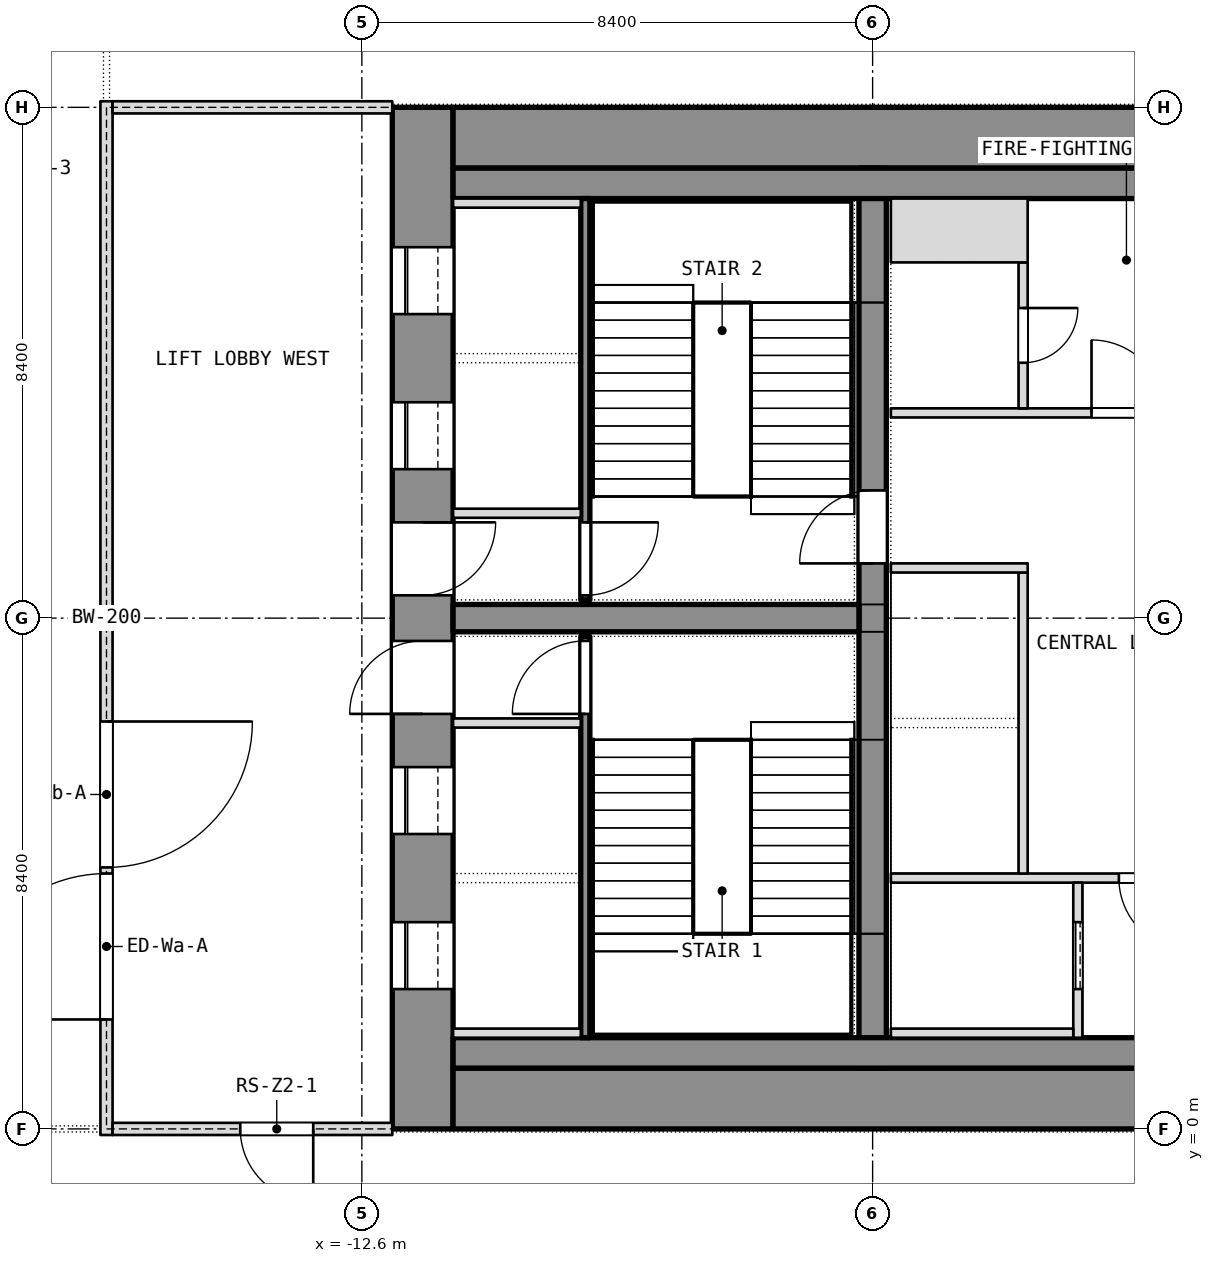
"""IFC4 building model, lengths in metres.
Left out: names, types, materials, properties, quantities, classifications, styles, units other than length and angle.
Written with IfcOpenShell. Run it as: python <this file> out.ifc"""

import sys

from ifc_helpers import new_model, si_unit, direction, frame, frame_2d, origin, place, context, subcontext, project, spatial, rectangle, extrude, element, fill, save


model = new_model("IFC4")
c1 = context("Model", 3, precision=1e-05, world=origin(), true_north=direction((0.0, 1.0)))
c2 = subcontext(c1, "Body", "Model", "MODEL_VIEW")
j1 = project(units=[si_unit("LENGTHUNIT", "METRE"), si_unit("PLANEANGLEUNIT", "RADIAN")], contexts=[c1])
p1 = place(None, origin())
s1 = spatial("IfcSite", under=j1, at=p1, CompositionType="ELEMENT")
p2 = place(p1, origin())
s2 = spatial("IfcBuilding", under=s1, at=p2, CompositionType="ELEMENT")
p3 = place(p2, frame((0.0, 0.0, 97.7)))
s3 = spatial("IfcBuildingStorey", under=s2, at=p3, CompositionType="ELEMENT", Elevation=97.7)
p4 = place(p3, frame((-11.6, 0.0, 0.0), z_axis=(0.0, 0.0, 1.0), x_axis=(0.0, 1.0, 0.0)))
e1 = element("IfcWall", 1, at=p4, inside=s3, PredefinedType="SHEAR", context=c2, shape_type="SweptSolid", body=[
    extrude(rectangle(XDim=16.8, YDim=1.0, at=frame_2d((8.4, 0.0))), origin(), (0.0, 0.0, 1.0), 7.2),
])
p5 = place(p4, frame((2.3, 0.0, 0.0)))
e2 = element("IfcOpeningElement", 2, at=p5, cuts=e1, PredefinedType="OPENING", context=c2, shape_type="SweptSolid", body=[
    extrude(rectangle(XDim=1.1, YDim=2.1, at=frame_2d((0.55, 1.05))), frame((0.0, 0.5, 0.0), z_axis=(0.0, -1.0, 0.0), x_axis=(1.0, 0.0, 0.0)), (0.0, 0.0, 1.0), 1.0),
])
p6 = place(p4, frame((4.85, 0.0, 0.0)))
e3 = element("IfcOpeningElement", 3, at=p6, cuts=e1, PredefinedType="OPENING", context=c2, shape_type="SweptSolid", body=[
    extrude(rectangle(XDim=1.1, YDim=2.1, at=frame_2d((0.55, 1.05))), frame((0.0, 0.5, 0.0), z_axis=(0.0, -1.0, 0.0), x_axis=(1.0, 0.0, 0.0)), (0.0, 0.0, 1.0), 1.0),
])
p7 = place(p4, frame((6.825, 0.0, 0.0)))
e4 = element("IfcOpeningElement", 4, at=p7, cuts=e1, PredefinedType="OPENING", context=c2, shape_type="SweptSolid", body=[
    extrude(rectangle(XDim=1.2, YDim=2.1, at=frame_2d((0.6, 1.05))), frame((0.0, 0.5, 0.0), z_axis=(0.0, -1.0, 0.0), x_axis=(1.0, 0.0, 0.0)), (0.0, 0.0, 1.0), 1.0),
])
p8 = place(p4, frame((13.4, 0.0, 0.0)))
e5 = element("IfcOpeningElement", 5, at=p8, cuts=e1, PredefinedType="OPENING", context=c2, shape_type="SweptSolid", body=[
    extrude(rectangle(XDim=1.1, YDim=2.1, at=frame_2d((0.55, 1.05))), frame((0.0, 0.5, 0.0), z_axis=(0.0, -1.0, 0.0), x_axis=(1.0, 0.0, 0.0)), (0.0, 0.0, 1.0), 1.0),
])
p9 = place(p4, frame((10.85, 0.0, 0.0)))
e6 = element("IfcOpeningElement", 6, at=p9, cuts=e1, PredefinedType="OPENING", context=c2, shape_type="SweptSolid", body=[
    extrude(rectangle(XDim=1.1, YDim=2.1, at=frame_2d((0.55, 1.05))), frame((0.0, 0.5, 0.0), z_axis=(0.0, -1.0, 0.0), x_axis=(1.0, 0.0, 0.0)), (0.0, 0.0, 1.0), 1.0),
])
p10 = place(p4, frame((8.775, 0.0, 0.0)))
e7 = element("IfcOpeningElement", 7, at=p10, cuts=e1, PredefinedType="OPENING", context=c2, shape_type="SweptSolid", body=[
    extrude(rectangle(XDim=1.2, YDim=2.1, at=frame_2d((0.6, 1.05))), frame((0.0, 0.5, 0.0), z_axis=(0.0, -1.0, 0.0), x_axis=(1.0, 0.0, 0.0)), (0.0, 0.0, 1.0), 1.0),
])
for number, where, z_axis, x_axis in (
    (8, (-11.1, 0.5, 0.0), (0.0, 0.0, 1.0), (1.0, 0.0, 0.0)),
    (9, (-11.1, 16.3, 0.0), (0.0, 0.0, 1.0), (1.0, 0.0, 0.0)),
):
    element("IfcWall", number, at=place(p3, frame(where, z_axis=z_axis, x_axis=x_axis)), inside=s3, PredefinedType="SHEAR", context=c2, shape_type="SweptSolid", body=[
        extrude(rectangle(XDim=22.2, YDim=1.0, at=frame_2d((11.1, 0.0))), origin(), (0.0, 0.0, 1.0), 7.2),
    ])
p11 = place(p3, frame((-4.2, 1.0, 0.0), z_axis=(0.0, 0.0, 1.0), x_axis=(0.0, 1.0, 0.0)))
e10 = element("IfcWall", 10, at=p11, inside=s3, PredefinedType="SHEAR", context=c2, shape_type="SweptSolid", body=[
    extrude(rectangle(XDim=14.8, YDim=0.45, at=frame_2d((7.4, 0.0))), origin(), (0.0, 0.0, 1.0), 7.2),
])
p12 = place(p11, frame((8.3, 0.0, 0.0)))
e11 = element("IfcOpeningElement", 11, at=p12, cuts=e10, PredefinedType="OPENING", context=c2, shape_type="SweptSolid", body=[
    extrude(rectangle(XDim=1.2, YDim=2.1, at=frame_2d((0.6, 1.05))), frame((0.0, 0.225, 0.0), z_axis=(0.0, -1.0, 0.0), x_axis=(1.0, 0.0, 0.0)), (0.0, 0.0, 1.0), 0.45),
])
p13 = place(p3, frame((-11.1, 8.4, 0.0), z_axis=(0.0, 0.0, 1.0), x_axis=(1.0, 0.0, 0.0)))
e12 = element("IfcWall", 12, at=p13, inside=s3, PredefinedType="SHEAR", context=c2, shape_type="SweptSolid", body=[
    extrude(rectangle(XDim=6.675, YDim=0.45, at=frame_2d((3.337, 0.0))), origin(), (0.0, 0.0, 1.0), 7.2),
])
for number, where, z_axis, x_axis in (
    (13, (-11.1, 1.25, 0.0), (0.0, 0.0, 1.0), (1.0, 0.0, 0.0)),
    (14, (-11.1, 15.55, 0.0), (0.0, 0.0, 1.0), (1.0, 0.0, 0.0)),
):
    element("IfcWall", number, at=place(p3, frame(where, z_axis=z_axis, x_axis=x_axis)), inside=s3, PredefinedType="PARTITIONING", context=c2, shape_type="SweptSolid", body=[
        extrude(rectangle(XDim=22.2, YDim=0.5, at=frame_2d((11.1, 0.0))), origin(), (0.0, 0.0, 1.0), 6.94),
    ])
p14 = place(p3, frame((-8.925, 1.5, 0.0), z_axis=(0.0, 0.0, 1.0), x_axis=(0.0, 1.0, 0.0)))
e15 = element("IfcWall", 15, at=p14, inside=s3, PredefinedType="SHEAR", context=c2, shape_type="SweptSolid", body=[
    extrude(rectangle(XDim=6.6, YDim=0.15, at=frame_2d((3.3, 0.0))), origin(), (0.0, 0.0, 1.0), 6.94),
])
p15 = place(p14, frame((5.325, 0.0, 0.0)))
e16 = element("IfcOpeningElement", 16, at=p15, cuts=e15, PredefinedType="OPENING", context=c2, shape_type="SweptSolid", body=[
    extrude(rectangle(XDim=1.2, YDim=2.1, at=frame_2d((0.6, 1.05))), frame((0.0, 0.075, 0.0), z_axis=(0.0, -1.0, 0.0), x_axis=(1.0, 0.0, 0.0)), (0.0, 0.0, 1.0), 0.15),
])
for number, where, z_axis, x_axis in (
    (17, (-11.1, 6.675, 0.0), (0.0, 0.0, 1.0), (1.0, 0.0, 0.0)),
    (18, (-11.1, 1.575, 0.0), (0.0, 0.0, 1.0), (1.0, 0.0, 0.0)),
):
    element("IfcWall", number, at=place(p3, frame(where, z_axis=z_axis, x_axis=x_axis)), inside=s3, PredefinedType="SHEAR", context=c2, shape_type="SweptSolid", body=[
        extrude(rectangle(XDim=2.1, YDim=0.15, at=frame_2d((1.05, 0.0))), origin(), (0.0, 0.0, 1.0), 6.94),
    ])
p16 = place(p3, frame((-8.925, 8.7, 0.0), z_axis=(0.0, 0.0, 1.0), x_axis=(0.0, 1.0, 0.0)))
e19 = element("IfcWall", 19, at=p16, inside=s3, PredefinedType="SHEAR", context=c2, shape_type="SweptSolid", body=[
    extrude(rectangle(XDim=6.6, YDim=0.15, at=frame_2d((3.3, 0.0))), origin(), (0.0, 0.0, 1.0), 6.94),
])
p17 = place(p16, frame((0.075, 0.0, 0.0)))
e20 = element("IfcOpeningElement", 20, at=p17, cuts=e19, PredefinedType="OPENING", context=c2, shape_type="SweptSolid", body=[
    extrude(rectangle(XDim=1.2, YDim=2.1, at=frame_2d((0.6, 1.05))), frame((0.0, 0.075, 0.0), z_axis=(0.0, -1.0, 0.0), x_axis=(1.0, 0.0, 0.0)), (0.0, 0.0, 1.0), 0.15),
])
for number, where, z_axis, x_axis in (
    (21, (-11.1, 10.125, 0.0), (0.0, 0.0, 1.0), (1.0, 0.0, 0.0)),
    (22, (-11.1, 15.225, 0.0), (0.0, 0.0, 1.0), (1.0, 0.0, 0.0)),
):
    element("IfcWall", number, at=place(p3, frame(where, z_axis=z_axis, x_axis=x_axis)), inside=s3, PredefinedType="SHEAR", context=c2, shape_type="SweptSolid", body=[
        extrude(rectangle(XDim=2.1, YDim=0.15, at=frame_2d((1.05, 0.0))), origin(), (0.0, 0.0, 1.0), 6.94),
    ])
p18 = place(p3, frame((-3.9, 4.125, 0.0), z_axis=(0.0, 0.0, 1.0), x_axis=(1.0, 0.0, 0.0)))
e23 = element("IfcWall", 23, at=p18, inside=s3, PredefinedType="PARTITIONING", context=c2, shape_type="SweptSolid", body=[
    extrude(rectangle(XDim=7.8, YDim=0.15, at=frame_2d((3.9, 0.0))), origin(), (0.0, 0.0, 1.0), 6.94),
])
p19 = place(p18, frame((3.75, 0.0, 0.0)))
e24 = element("IfcOpeningElement", 24, at=p19, cuts=e23, PredefinedType="OPENING", context=c2, shape_type="SweptSolid", body=[
    extrude(rectangle(XDim=1.2, YDim=2.1, at=frame_2d((0.6, 1.05))), frame((0.0, 0.075, 0.0), z_axis=(0.0, -1.0, 0.0), x_axis=(1.0, 0.0, 0.0)), (0.0, 0.0, 1.0), 0.15),
])
p20 = place(p3, frame((-3.9, 11.775, 0.0), z_axis=(0.0, 0.0, 1.0), x_axis=(1.0, 0.0, 0.0)))
e25 = element("IfcWall", 25, at=p20, inside=s3, PredefinedType="PARTITIONING", context=c2, shape_type="SweptSolid", body=[
    extrude(rectangle(XDim=7.8, YDim=0.15, at=frame_2d((3.9, 0.0))), origin(), (0.0, 0.0, 1.0), 6.94),
])
p21 = place(p20, frame((3.3, 0.0, 0.0)))
e26 = element("IfcOpeningElement", 26, at=p21, cuts=e25, PredefinedType="OPENING", context=c2, shape_type="SweptSolid", body=[
    extrude(rectangle(XDim=1.2, YDim=2.1, at=frame_2d((0.6, 1.05))), frame((0.0, 0.075, 0.0), z_axis=(0.0, -1.0, 0.0), x_axis=(1.0, 0.0, 0.0)), (0.0, 0.0, 1.0), 0.15),
])
p22 = place(p3, frame((-0.825, 1.5, 0.0), z_axis=(0.0, 0.0, 1.0), x_axis=(0.0, 1.0, 0.0)))
e27 = element("IfcWall", 27, at=p22, inside=s3, PredefinedType="SHEAR", context=c2, shape_type="SweptSolid", body=[
    extrude(rectangle(XDim=2.55, YDim=0.15, at=frame_2d((1.275, 0.0))), origin(), (0.0, 0.0, 1.0), 7.2),
])
p23 = place(p22, frame((0.8, 0.0, 0.0)))
e28 = element("IfcOpeningElement", 28, at=p23, cuts=e27, PredefinedType="OPENING", context=c2, shape_type="SweptSolid", body=[
    extrude(rectangle(XDim=1.1, YDim=2.1, at=frame_2d((0.55, 1.05))), frame((0.0, 0.075, 0.0), z_axis=(0.0, -1.0, 0.0), x_axis=(1.0, 0.0, 0.0)), (0.0, 0.0, 1.0), 0.15),
])
p24 = place(p3, frame((-3.9, 1.575, 0.0), z_axis=(0.0, 0.0, 1.0), x_axis=(1.0, 0.0, 0.0)))
e29 = element("IfcWall", 29, at=p24, inside=s3, PredefinedType="SHEAR", context=c2, shape_type="SweptSolid", body=[
    extrude(rectangle(XDim=3.0, YDim=0.15, at=frame_2d((1.5, 0.0))), origin(), (0.0, 0.0, 1.0), 7.2),
])
p25 = place(p3, frame((-1.725, 4.2, 0.0), z_axis=(0.0, 0.0, 1.0), x_axis=(0.0, 1.0, 0.0)))
e30 = element("IfcWall", 30, at=p25, inside=s3, PredefinedType="SHEAR", context=c2, shape_type="SweptSolid", body=[
    extrude(rectangle(XDim=4.95, YDim=0.15, at=frame_2d((2.475, 0.0))), origin(), (0.0, 0.0, 1.0), 7.2),
])
p26 = place(p3, frame((-3.9, 9.225, 0.0), z_axis=(0.0, 0.0, 1.0), x_axis=(1.0, 0.0, 0.0)))
e31 = element("IfcWall", 31, at=p26, inside=s3, PredefinedType="SHEAR", context=c2, shape_type="SweptSolid", body=[
    extrude(rectangle(XDim=2.25, YDim=0.15, at=frame_2d((1.125, 0.0))), origin(), (0.0, 0.0, 1.0), 7.2),
])
p27 = place(p3, frame((-1.725, 11.85, 0.0), z_axis=(0.0, 0.0, 1.0), x_axis=(0.0, 1.0, 0.0)))
e32 = element("IfcWall", 32, at=p27, inside=s3, PredefinedType="PARTITIONING", context=c2, shape_type="SweptSolid", body=[
    extrude(rectangle(XDim=2.4, YDim=0.15, at=frame_2d((1.2, 0.0))), origin(), (0.0, 0.0, 1.0), 6.94),
])
p28 = place(p27, frame((0.75, 0.0, 0.0)))
e33 = element("IfcOpeningElement", 33, at=p28, cuts=e32, PredefinedType="OPENING", context=c2, shape_type="SweptSolid", body=[
    extrude(rectangle(XDim=0.9, YDim=2.1, at=frame_2d((0.45, 1.05))), frame((0.0, 0.075, 0.0), z_axis=(0.0, -1.0, 0.0), x_axis=(1.0, 0.0, 0.0)), (0.0, 0.0, 1.0), 0.15),
])
p29 = place(p3, frame((-3.9, 14.775, 0.0), z_axis=(0.0, 0.0, 1.0), x_axis=(1.0, 0.0, 0.0)))
e34 = element("IfcWall", 34, at=p29, inside=s3, PredefinedType="PARTITIONING", context=c2, shape_type="SweptSolid", body=[
    extrude(rectangle(XDim=2.25, YDim=1.05, at=frame_2d((1.125, 0.0))), origin(), (0.0, 0.0, 1.0), 6.94),
])
p30 = place(p3, frame((-16.8, -0.1, 0.0), z_axis=(0.0, 0.0, 1.0), x_axis=(0.0, 1.0, 0.0)))
e35 = element("IfcWall", 35, at=p30, inside=s3, PredefinedType="PARTITIONING", context=c2, shape_type="SweptSolid", body=[
    extrude(rectangle(XDim=17.0, YDim=0.2, at=frame_2d((8.5, 0.0))), origin(), (0.0, 0.0, 1.0), 6.94),
])
p31 = place(p30, frame((1.9, 0.0, 0.0)))
e36 = element("IfcOpeningElement", 36, at=p31, cuts=e35, PredefinedType="OPENING", context=c2, shape_type="SweptSolid", body=[
    extrude(rectangle(XDim=2.4, YDim=2.1, at=frame_2d((1.2, 1.05))), frame((0.0, 0.1, 0.0), z_axis=(0.0, -1.0, 0.0), x_axis=(1.0, 0.0, 0.0)), (0.0, 0.0, 1.0), 0.2),
])
p32 = place(p30, frame((4.4, 0.0, 0.0)))
e37 = element("IfcOpeningElement", 37, at=p32, cuts=e35, PredefinedType="OPENING", context=c2, shape_type="SweptSolid", body=[
    extrude(rectangle(XDim=2.4, YDim=2.1, at=frame_2d((1.2, 1.05))), frame((0.0, 0.1, 0.0), z_axis=(0.0, -1.0, 0.0), x_axis=(1.0, 0.0, 0.0)), (0.0, 0.0, 1.0), 0.2),
])
p33 = place(p3, frame((-16.7, 0.0, 0.0), z_axis=(0.0, 0.0, 1.0), x_axis=(1.0, 0.0, 0.0)))
e38 = element("IfcWall", 38, at=p33, inside=s3, PredefinedType="PARTITIONING", context=c2, shape_type="SweptSolid", body=[
    extrude(rectangle(XDim=4.6, YDim=0.2, at=frame_2d((2.3, 0.0))), origin(), (0.0, 0.0, 1.0), 6.49),
])
p34 = place(p33, frame((2.1, 0.0, 0.0)))
e39 = element("IfcOpeningElement", 39, at=p34, cuts=e38, PredefinedType="OPENING", context=c2, shape_type="SweptSolid", body=[
    extrude(rectangle(XDim=1.2, YDim=2.1, at=frame_2d((0.6, 1.05))), frame((0.0, 0.1, 0.0), z_axis=(0.0, -1.0, 0.0), x_axis=(1.0, 0.0, 0.0)), (0.0, 0.0, 1.0), 0.2),
])
p35 = place(p3, frame((-16.7, 16.8, 0.0), z_axis=(0.0, 0.0, 1.0), x_axis=(1.0, 0.0, 0.0)))
e40 = element("IfcWall", 40, at=p35, inside=s3, PredefinedType="PARTITIONING", context=c2, shape_type="SweptSolid", body=[
    extrude(rectangle(XDim=4.6, YDim=0.2, at=frame_2d((2.3, 0.0))), origin(), (0.0, 0.0, 1.0), 6.49),
])
p36 = place(p5, origin())
e41 = element("IfcDoor", 41, at=p36, inside=s3, OperationType="SLIDING_TO_LEFT", PredefinedType="DOOR", context=c2, shape_type="SweptSolid", body=[
    extrude(rectangle(XDim=1.1, YDim=2.1, at=frame_2d((0.55, 1.05))), frame((0.0, 0.025, 0.0), z_axis=(0.0, -1.0, 0.0), x_axis=(1.0, 0.0, 0.0)), (0.0, 0.0, 1.0), 0.05),
])
fill(e2, e41)
p37 = place(p6, origin())
e42 = element("IfcDoor", 42, at=p37, inside=s3, OperationType="SLIDING_TO_LEFT", PredefinedType="DOOR", context=c2, shape_type="SweptSolid", body=[
    extrude(rectangle(XDim=1.1, YDim=2.1, at=frame_2d((0.55, 1.05))), frame((0.0, 0.025, 0.0), z_axis=(0.0, -1.0, 0.0), x_axis=(1.0, 0.0, 0.0)), (0.0, 0.0, 1.0), 0.05),
])
fill(e3, e42)
p38 = place(p7, origin())
e43 = element("IfcDoor", 43, at=p38, inside=s3, OperationType="SINGLE_SWING_LEFT", PredefinedType="DOOR", context=c2, shape_type="SweptSolid", body=[
    extrude(rectangle(XDim=1.2, YDim=2.1, at=frame_2d((0.6, 1.05))), frame((0.0, 0.025, 0.0), z_axis=(0.0, -1.0, 0.0), x_axis=(1.0, 0.0, 0.0)), (0.0, 0.0, 1.0), 0.05),
])
fill(e4, e43)
p39 = place(p15, origin())
e44 = element("IfcDoor", 44, at=p39, inside=s3, OperationType="SINGLE_SWING_LEFT", PredefinedType="DOOR", context=c2, shape_type="SweptSolid", body=[
    extrude(rectangle(XDim=1.2, YDim=2.1, at=frame_2d((0.6, 1.05))), frame((0.0, 0.025, 0.0), z_axis=(0.0, -1.0, 0.0), x_axis=(1.0, 0.0, 0.0)), (0.0, 0.0, 1.0), 0.05),
])
fill(e16, e44)
p40 = place(p8, origin())
e45 = element("IfcDoor", 45, at=p40, inside=s3, OperationType="SLIDING_TO_LEFT", PredefinedType="DOOR", context=c2, shape_type="SweptSolid", body=[
    extrude(rectangle(XDim=1.1, YDim=2.1, at=frame_2d((0.55, 1.05))), frame((0.0, 0.025, 0.0), z_axis=(0.0, -1.0, 0.0), x_axis=(1.0, 0.0, 0.0)), (0.0, 0.0, 1.0), 0.05),
])
fill(e5, e45)
p41 = place(p9, origin())
e46 = element("IfcDoor", 46, at=p41, inside=s3, OperationType="SLIDING_TO_LEFT", PredefinedType="DOOR", context=c2, shape_type="SweptSolid", body=[
    extrude(rectangle(XDim=1.1, YDim=2.1, at=frame_2d((0.55, 1.05))), frame((0.0, 0.025, 0.0), z_axis=(0.0, -1.0, 0.0), x_axis=(1.0, 0.0, 0.0)), (0.0, 0.0, 1.0), 0.05),
])
fill(e6, e46)
p42 = place(p10, origin())
e47 = element("IfcDoor", 47, at=p42, inside=s3, OperationType="SINGLE_SWING_LEFT", PredefinedType="DOOR", context=c2, shape_type="SweptSolid", body=[
    extrude(rectangle(XDim=1.2, YDim=2.1, at=frame_2d((0.6, 1.05))), frame((0.0, 0.025, 0.0), z_axis=(0.0, -1.0, 0.0), x_axis=(1.0, 0.0, 0.0)), (0.0, 0.0, 1.0), 0.05),
])
fill(e7, e47)
p43 = place(p17, origin())
e48 = element("IfcDoor", 48, at=p43, inside=s3, OperationType="SINGLE_SWING_LEFT", PredefinedType="DOOR", context=c2, shape_type="SweptSolid", body=[
    extrude(rectangle(XDim=1.2, YDim=2.1, at=frame_2d((0.6, 1.05))), frame((0.0, 0.025, 0.0), z_axis=(0.0, -1.0, 0.0), x_axis=(1.0, 0.0, 0.0)), (0.0, 0.0, 1.0), 0.05),
])
fill(e20, e48)
p44 = place(p23, origin())
e49 = element("IfcDoor", 49, at=p44, inside=s3, OperationType="SLIDING_TO_LEFT", PredefinedType="DOOR", context=c2, shape_type="SweptSolid", body=[
    extrude(rectangle(XDim=1.1, YDim=2.1, at=frame_2d((0.55, 1.05))), frame((0.0, 0.025, 0.0), z_axis=(0.0, -1.0, 0.0), x_axis=(1.0, 0.0, 0.0)), (0.0, 0.0, 1.0), 0.05),
])
fill(e28, e49)
p45 = place(p19, origin())
e50 = element("IfcDoor", 50, at=p45, inside=s3, OperationType="SINGLE_SWING_LEFT", PredefinedType="DOOR", context=c2, shape_type="SweptSolid", body=[
    extrude(rectangle(XDim=1.2, YDim=2.1, at=frame_2d((0.6, 1.05))), frame((0.0, 0.025, 0.0), z_axis=(0.0, -1.0, 0.0), x_axis=(1.0, 0.0, 0.0)), (0.0, 0.0, 1.0), 0.05),
])
fill(e24, e50)
p46 = place(p21, origin())
e51 = element("IfcDoor", 51, at=p46, inside=s3, OperationType="SINGLE_SWING_LEFT", PredefinedType="DOOR", context=c2, shape_type="SweptSolid", body=[
    extrude(rectangle(XDim=1.2, YDim=2.1, at=frame_2d((0.6, 1.05))), frame((0.0, 0.025, 0.0), z_axis=(0.0, -1.0, 0.0), x_axis=(1.0, 0.0, 0.0)), (0.0, 0.0, 1.0), 0.05),
])
fill(e26, e51)
p47 = place(p28, origin())
e52 = element("IfcDoor", 52, at=p47, inside=s3, OperationType="SINGLE_SWING_LEFT", PredefinedType="DOOR", context=c2, shape_type="SweptSolid", body=[
    extrude(rectangle(XDim=0.9, YDim=2.1, at=frame_2d((0.45, 1.05))), frame((0.0, 0.025, 0.0), z_axis=(0.0, -1.0, 0.0), x_axis=(1.0, 0.0, 0.0)), (0.0, 0.0, 1.0), 0.05),
])
fill(e33, e52)
p48 = place(p12, origin())
e53 = element("IfcDoor", 53, at=p48, inside=s3, OperationType="SINGLE_SWING_LEFT", PredefinedType="DOOR", context=c2, shape_type="SweptSolid", body=[
    extrude(rectangle(XDim=1.2, YDim=2.1, at=frame_2d((0.6, 1.05))), frame((0.0, 0.025, 0.0), z_axis=(0.0, -1.0, 0.0), x_axis=(1.0, 0.0, 0.0)), (0.0, 0.0, 1.0), 0.05),
])
fill(e11, e53)
p49 = place(p31, origin())
e54 = element("IfcDoor", 54, at=p49, inside=s3, OperationType="DOUBLE_DOOR_SINGLE_SWING", PredefinedType="DOOR", context=c2, shape_type="SweptSolid", body=[
    extrude(rectangle(XDim=2.4, YDim=2.1, at=frame_2d((1.2, 1.05))), frame((0.0, 0.025, 0.0), z_axis=(0.0, -1.0, 0.0), x_axis=(1.0, 0.0, 0.0)), (0.0, 0.0, 1.0), 0.05),
])
fill(e36, e54)
p50 = place(p32, origin())
e55 = element("IfcDoor", 55, at=p50, inside=s3, OperationType="DOUBLE_DOOR_SINGLE_SWING", PredefinedType="DOOR", context=c2, shape_type="SweptSolid", body=[
    extrude(rectangle(XDim=2.4, YDim=2.1, at=frame_2d((1.2, 1.05))), frame((0.0, 0.025, 0.0), z_axis=(0.0, -1.0, 0.0), x_axis=(1.0, 0.0, 0.0)), (0.0, 0.0, 1.0), 0.05),
])
fill(e37, e55)
p51 = place(p34, origin())
e56 = element("IfcDoor", 56, at=p51, inside=s3, OperationType="SINGLE_SWING_LEFT", PredefinedType="DOOR", context=c2, shape_type="SweptSolid", body=[
    extrude(rectangle(XDim=1.2, YDim=2.1, at=frame_2d((0.6, 1.05))), frame((0.0, 0.025, 0.0), z_axis=(0.0, -1.0, 0.0), x_axis=(1.0, 0.0, 0.0)), (0.0, 0.0, 1.0), 0.05),
])
fill(e39, e56)
save(model, sys.argv[1])
